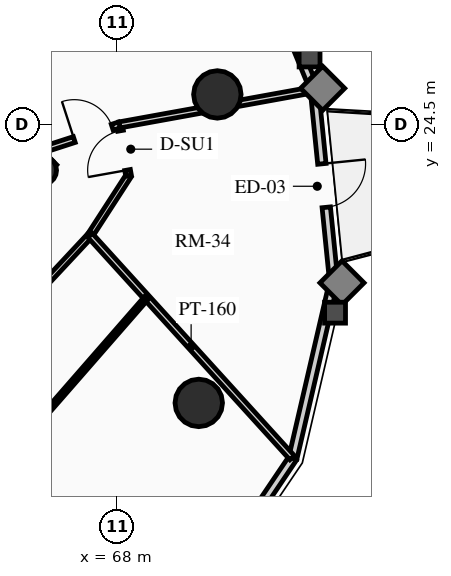
"""IFC4 building model, lengths in metres.
Left out: names, types, materials, properties, quantities, classifications, styles, units other than length and angle.
Written with IfcOpenShell. Run it as: python <this file> out.ifc"""

import sys

from ifc_helpers import new_model, si_unit, direction, frame, frame_2d, origin, origin_2d, place, context, subcontext, project, spatial, rectangle, circle, hollow_circle, extrude, source, transform, mapped, element, fill, save


model = new_model("IFC4")
c1 = context("Model", 3, precision=1e-05, world=origin(), true_north=direction((0.0, 1.0)))
c2 = subcontext(c1, "Body", "Model", "MODEL_VIEW")
j1 = project(units=[si_unit("LENGTHUNIT", "METRE"), si_unit("PLANEANGLEUNIT", "RADIAN")], contexts=[c1])
p1 = place(None, origin())
s1 = spatial("IfcSite", under=j1, at=p1, CompositionType="ELEMENT")
p2 = place(p1, origin())
s2 = spatial("IfcBuilding", under=s1, at=p2, CompositionType="ELEMENT")
p3 = place(p2, frame((0.0, 0.0, 160.33)))
s3 = spatial("IfcBuildingStorey", under=s2, at=p3, CompositionType="ELEMENT", Elevation=160.33)
p4 = place(p3, frame((66.268, 23.298, 0.0), z_axis=(0.0, 0.0, 1.0), x_axis=(-0.707106781187, 0.707106781187, 0.0)))
e1 = element("IfcWall", 1, at=p4, inside=s3, PredefinedType="SHEAR", context=c2, shape_type="SweptSolid", body=[
    extrude(rectangle(XDim=14.1, YDim=0.4, at=frame_2d((7.05, 0.0))), origin(), (0.0, 0.0, 1.0), 2.91),
])
p5 = place(p3, frame((66.024, 23.294, 0.0), z_axis=(0.0, 0.0, 1.0), x_axis=(0.707106781187, 0.707106781187, 0.0)))
e2 = element("IfcColumn", 2, at=p5, inside=s3, PredefinedType="COLUMN", context=c2, shape_type="SweptSolid", body=[
    extrude(hollow_circle(Radius=0.38, WallThickness=0.032, at=origin_2d()), origin(), (0.0, 0.0, 1.0), 2.91),
])
for number, where, z_axis, x_axis in (
    (3, (70.146, 17.173, 0.0), (0.0, 0.0, 1.0), (1.0, 0.0, 0.0)),
    (4, (70.635, 25.291, 0.0), (0.0, 0.0, 1.0), (1.0, 0.0, 0.0)),
):
    element("IfcColumn", number, at=place(p3, frame(where, z_axis=z_axis, x_axis=x_axis)), inside=s3, PredefinedType="USERDEFINED", context=c2, shape_type="SweptSolid", body=[
        extrude(circle(Radius=0.625, at=origin_2d()), origin(), (0.0, 0.0, 1.0), 2.91),
    ])
p6 = place(p3, frame((72.622, 15.721, 0.0), z_axis=(0.0, 0.0, 1.0), x_axis=(-0.559635286042, -0.828739009952, 0.0)))
e5 = element("IfcWall", 5, at=p6, inside=s3, PredefinedType="SOLIDWALL", context=c2, shape_type="SweptSolid", body=[
    extrude(rectangle(XDim=4.569, YDim=0.22, at=frame_2d((2.284, 0.0))), origin(), (0.0, 0.0, 1.0), 2.245),
])
m1 = source(origin(), c2, "Body", "SweptSolid", [
    extrude(rectangle(XDim=1.6, YDim=1.3, at=frame_2d((0.8, 0.65))), frame((0.0, 0.12, 0.0), z_axis=(0.0, -1.0, 0.0), x_axis=(1.0, 0.0, 0.0)), (0.0, 0.0, 1.0), 0.24),
])
p7 = place(p6, frame((1.484, 0.0, 0.65)))
e6 = element("IfcOpeningElement", 6, at=p7, cuts=e5, PredefinedType="OPENING", context=c2, shape_type="MappedRepresentation", body=[
    mapped(m1, transform((0.0, 0.0, 0.0), x_axis=(1.0, 0.0, 0.0), y_axis=(0.0, 1.0, 0.0), z_axis=(0.0, 0.0, 1.0), scale=1.0)),
])
p8 = place(p3, frame((73.698, 20.367, 0.0), z_axis=(0.0, 0.0, 1.0), x_axis=(-0.225659540039, -0.974206226622, 0.0)))
e7 = element("IfcWall", 7, at=p8, inside=s3, PredefinedType="SOLIDWALL", context=c2, shape_type="SweptSolid", body=[
    extrude(rectangle(XDim=4.769, YDim=0.22, at=frame_2d((2.385, 0.0))), origin(), (0.0, 0.0, 1.0), 2.245),
])
p9 = place(p3, frame((73.189, 25.418, 0.0), z_axis=(0.0, 0.0, 1.0), x_axis=(0.100279889424, -0.994959267396, 0.0)))
e8 = element("IfcWall", 8, at=p9, inside=s3, PredefinedType="SOLIDWALL", context=c2, shape_type="SweptSolid", body=[
    extrude(rectangle(XDim=5.076, YDim=0.22, at=frame_2d((2.538, 0.0))), origin(), (0.0, 0.0, 1.0), 2.245),
])
m2 = source(origin(), c2, "Body", "SweptSolid", [
    extrude(rectangle(XDim=1.15, YDim=2.005, at=frame_2d((0.575, 1.002))), frame((0.0, 0.12, 0.0), z_axis=(0.0, -1.0, 0.0), x_axis=(1.0, 0.0, 0.0)), (0.0, 0.0, 1.0), 0.24),
])
p10 = place(p9, frame((1.963, 0.0, 0.0)))
e9 = element("IfcOpeningElement", 9, at=p10, cuts=e8, PredefinedType="OPENING", context=c2, shape_type="MappedRepresentation", body=[
    mapped(m2, transform((0.0, 0.0, 0.0), x_axis=(1.0, 0.0, 0.0), y_axis=(0.0, 1.0, 0.0), z_axis=(0.0, 0.0, 1.0), scale=1.0)),
])
p11 = place(p3, frame((71.144, 30.378, 0.0), z_axis=(0.0, 0.0, 1.0), x_axis=(0.38111364655, -0.924528197738, 0.0)))
e10 = element("IfcWall", 10, at=p11, inside=s3, PredefinedType="SOLIDWALL", context=c2, shape_type="SweptSolid", body=[
    extrude(rectangle(XDim=5.366, YDim=0.22, at=frame_2d((2.683, 0.0))), origin(), (0.0, 0.0, 1.0), 2.245),
])
p12 = place(p3, frame((62.812, 16.788, 0.0), z_axis=(0.0, 0.0, 1.0), x_axis=(0.682323555485, 0.731050316757, 0.0)))
e11 = element("IfcWall", 11, at=p12, inside=s3, PredefinedType="PARTITIONING", context=c2, shape_type="SweptSolid", body=[
    extrude(rectangle(XDim=6.559, YDim=0.15, at=frame_2d((3.279, 0.0))), origin(), (0.0, 0.0, 1.0), 2.245),
])
p13 = place(p3, frame((67.287, 21.582, 0.0), z_axis=(0.0, 0.0, 1.0), x_axis=(0.543202443884, 0.839601753785, 0.0)))
e12 = element("IfcWall", 12, at=p13, inside=s3, PredefinedType="PARTITIONING", context=c2, shape_type="SweptSolid", body=[
    extrude(rectangle(XDim=1.866, YDim=0.15, at=frame_2d((0.933, 0.0))), origin(), (0.0, 0.0, 1.0), 2.245),
])
p14 = place(p3, frame((68.3, 23.149, 0.0), z_axis=(0.0, 0.0, 1.0), x_axis=(-0.176423554694, 0.984314344785, 0.0)))
e13 = element("IfcWall", 13, at=p14, inside=s3, PredefinedType="PARTITIONING", context=c2, shape_type="SweptSolid", body=[
    extrude(rectangle(XDim=1.362, YDim=0.15, at=frame_2d((0.681, 0.0))), origin(), (0.0, 0.0, 1.0), 2.245),
])
m3 = source(origin(), c2, "Body", "SweptSolid", [
    extrude(rectangle(XDim=1.05, YDim=2.015, at=frame_2d((0.525, 1.007))), frame((0.0, 0.085, 0.0), z_axis=(0.0, -1.0, 0.0), x_axis=(1.0, 0.0, 0.0)), (0.0, 0.0, 1.0), 0.17),
])
p15 = place(p14, frame((0.156, 0.0, 0.0)))
e14 = element("IfcOpeningElement", 14, at=p15, cuts=e13, PredefinedType="OPENING", context=c2, shape_type="MappedRepresentation", body=[
    mapped(m3, transform((0.0, 0.0, 0.0), x_axis=(1.0, 0.0, 0.0), y_axis=(0.0, 1.0, 0.0), z_axis=(0.0, 0.0, 1.0), scale=1.0)),
])
p16 = place(p3, frame((67.287, 21.582, 0.0), z_axis=(0.0, 0.0, 1.0), x_axis=(0.672520632772, -0.740078373212, 0.0)))
e15 = element("IfcWall", 15, at=p16, inside=s3, PredefinedType="PARTITIONING", context=c2, shape_type="SweptSolid", body=[
    extrude(rectangle(XDim=7.907, YDim=0.16, at=frame_2d((3.954, 0.0))), origin(), (0.0, 0.0, 1.0), 2.245),
])
p17 = place(p3, frame((68.06, 24.489, 0.0), z_axis=(0.0, 0.0, 1.0), x_axis=(0.983987798657, 0.178235832802, 0.0)))
e16 = element("IfcWall", 16, at=p17, inside=s3, PredefinedType="PARTITIONING", context=c2, shape_type="SweptSolid", body=[
    extrude(rectangle(XDim=5.193, YDim=0.16, at=frame_2d((2.596, 0.0))), origin(), (0.0, 0.0, 1.0), 2.245),
])
p18 = place(p3, frame((66.021, 23.828, 0.0), z_axis=(0.0, 0.0, 1.0), x_axis=(0.951292345965, 0.308290240695, 0.0)))
e17 = element("IfcWall", 17, at=p18, inside=s3, PredefinedType="PARTITIONING", context=c2, shape_type="SweptSolid", body=[
    extrude(rectangle(XDim=2.144, YDim=0.16, at=frame_2d((1.072, 0.0))), origin(), (0.0, 0.0, 1.0), 2.245),
])
m4 = source(origin(), c2, "Body", "SweptSolid", [
    extrude(rectangle(XDim=1.05, YDim=2.015, at=frame_2d((0.525, 1.007))), frame((0.0, 0.09, 0.0), z_axis=(0.0, -1.0, 0.0), x_axis=(1.0, 0.0, 0.0)), (0.0, 0.0, 1.0), 0.18),
])
p19 = place(p18, frame((0.894, 0.0, 0.0)))
e18 = element("IfcOpeningElement", 18, at=p19, cuts=e17, PredefinedType="OPENING", context=c2, shape_type="MappedRepresentation", body=[
    mapped(m4, transform((0.0, 0.0, 0.0), x_axis=(1.0, 0.0, 0.0), y_axis=(0.0, 1.0, 0.0), z_axis=(0.0, 0.0, 1.0), scale=1.0)),
])
p20 = place(p3, frame((64.839, 15.433, 0.0), z_axis=(0.0, 0.0, 1.0), x_axis=(0.657505208165, 0.753449999161, 0.0)))
e19 = element("IfcWall", 19, at=p20, inside=s3, PredefinedType="PARTITIONING", context=c2, shape_type="SweptSolid", body=[
    extrude(rectangle(XDim=5.988, YDim=0.125, at=frame_2d((2.994, 0.0))), origin(), (0.0, 0.0, 1.0), 2.245),
])
m5 = source(origin(), c2, "Body", "SweptSolid", [
    extrude(rectangle(XDim=1.15, YDim=2.005, at=frame_2d((0.575, 1.002))), frame((0.0, 0.025, 0.0), z_axis=(0.0, -1.0, 0.0), x_axis=(1.0, 0.0, 0.0)), (0.0, 0.0, 1.0), 0.05),
])
p21 = place(p10, origin())
e20 = element("IfcDoor", 20, at=p21, inside=s3, OperationType="SINGLE_SWING_LEFT", PredefinedType="DOOR", context=c2, shape_type="MappedRepresentation", body=[
    mapped(m5, transform((0.0, 0.0, 0.0), x_axis=(1.0, 0.0, 0.0), y_axis=(0.0, 1.0, 0.0), z_axis=(0.0, 0.0, 1.0), scale=1.0)),
])
fill(e9, e20)
m6 = source(origin(), c2, "Body", "SweptSolid", [
    extrude(rectangle(XDim=1.05, YDim=2.015, at=frame_2d((0.525, 1.007))), frame((0.0, 0.025, 0.0), z_axis=(0.0, -1.0, 0.0), x_axis=(1.0, 0.0, 0.0)), (0.0, 0.0, 1.0), 0.05),
])
p22 = place(p19, origin())
e21 = element("IfcDoor", 21, at=p22, inside=s3, OperationType="SINGLE_SWING_LEFT", PredefinedType="DOOR", context=c2, shape_type="MappedRepresentation", body=[
    mapped(m6, transform((0.0, 0.0, 0.0), x_axis=(1.0, 0.0, 0.0), y_axis=(0.0, 1.0, 0.0), z_axis=(0.0, 0.0, 1.0), scale=1.0)),
])
fill(e18, e21)
p23 = place(p15, origin())
e22 = element("IfcDoor", 22, at=p23, inside=s3, OperationType="SINGLE_SWING_LEFT", PredefinedType="DOOR", context=c2, shape_type="MappedRepresentation", body=[
    mapped(m6, transform((0.0, 0.0, 0.0), x_axis=(1.0, 0.0, 0.0), y_axis=(0.0, 1.0, 0.0), z_axis=(0.0, 0.0, 1.0), scale=1.0)),
])
fill(e14, e22)
save(model, sys.argv[1])
